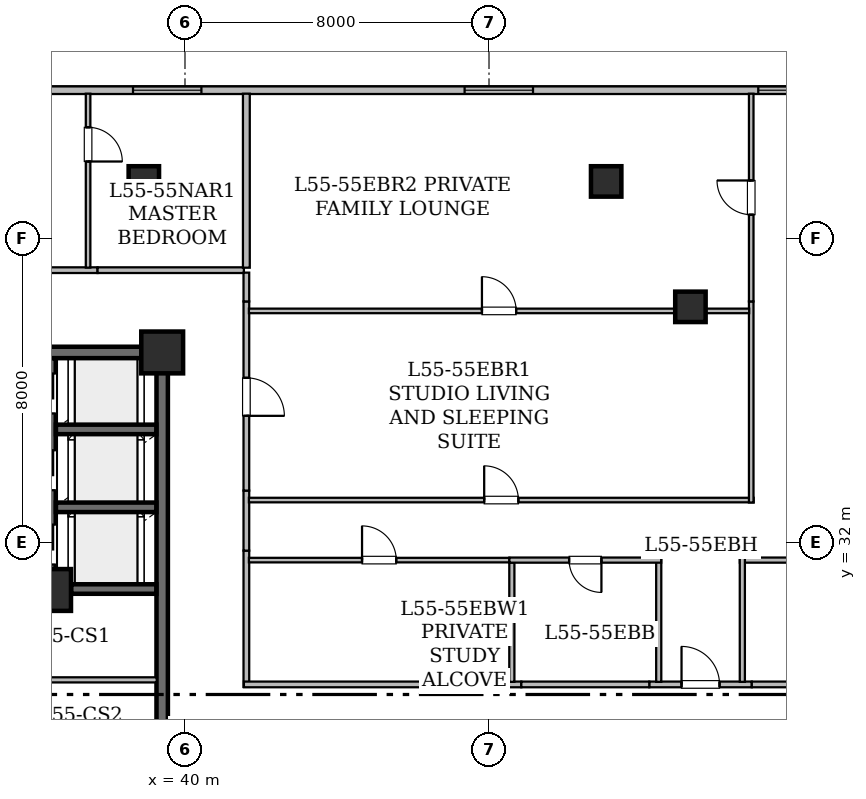
"""IFC4 building model, lengths in metres.
Left out: names, types, materials, properties, quantities, classifications, styles, units other than length and angle.
Written with IfcOpenShell. Run it as: python <this file> out.ifc"""

import sys

from ifc_helpers import new_model, si_unit, direction, frame, frame_2d, origin, origin_2d, place, context, subcontext, project, spatial, rectangle, hollow_rectangle, extrude, element, fill, save


model = new_model("IFC4")
c1 = context("Model", 3, precision=1e-05, world=origin(), true_north=direction((0.0, 1.0)))
c2 = subcontext(c1, "Body", "Model", "MODEL_VIEW")
j1 = project(units=[si_unit("LENGTHUNIT", "METRE"), si_unit("PLANEANGLEUNIT", "RADIAN")], contexts=[c1])
p1 = place(None, origin())
s1 = spatial("IfcSite", under=j1, at=p1, CompositionType="ELEMENT")
p2 = place(p1, origin())
s2 = spatial("IfcBuilding", under=s1, at=p2, CompositionType="ELEMENT")
p3 = place(p2, frame((0.0, 0.0, 217.2)))
s3 = spatial("IfcBuildingStorey", under=s2, at=p3, CompositionType="ELEMENT", Elevation=217.2)
for number, where, z_axis, x_axis in (
    (1, (36.45, 30.75, 0.0), (0.0, 0.0, 1.0), (1.0, 0.0, 0.0)),
    (2, (39.4, 37.0, 0.0), (0.0, 0.0, 1.0), (1.0, 0.0, 0.0)),
):
    element("IfcColumn", number, at=place(p3, frame(where, z_axis=z_axis, x_axis=x_axis)), inside=s3, PredefinedType="COLUMN", context=c2, shape_type="SweptSolid", body=[
        extrude(hollow_rectangle(XDim=1.1, YDim=1.1, WallThickness=0.055, at=origin_2d()), origin(), (0.0, 0.0, 1.0), 3.65),
    ])
for number, where, z_axis, x_axis in (
    (3, (38.917, 41.5, 0.025), (0.0, 0.0, 1.0), (1.0, 0.0, 0.0)),
    (4, (51.083, 41.5, 0.025), (0.0, 0.0, 1.0), (1.0, 0.0, 0.0)),
    (5, (53.3, 38.2, 0.025), (0.0, 0.0, 1.0), (1.0, 0.0, 0.0)),
):
    element("IfcColumn", number, at=place(p3, frame(where, z_axis=z_axis, x_axis=x_axis)), inside=s3, PredefinedType="COLUMN", context=c2, shape_type="SweptSolid", body=[
        extrude(hollow_rectangle(XDim=0.8, YDim=0.8, WallThickness=0.04, at=origin_2d()), origin(), (0.0, 0.0, 1.0), 3.625),
    ])
p4 = place(p3, frame((24.302, 43.9, 0.0), z_axis=(0.0, 0.0, 1.0), x_axis=(1.0, 0.0, 0.0)))
e6 = element("IfcWall", 6, at=p4, inside=s3, PredefinedType="STANDARD", context=c2, shape_type="SweptSolid", body=[
    extrude(rectangle(XDim=41.457, YDim=0.2, at=frame_2d((20.729, 0.0))), origin(), (0.0, 0.0, 1.0), 3.43),
])
p5 = place(p4, frame((0.509, 0.0, 0.85)))
e7 = element("IfcOpeningElement", 7, at=p5, cuts=e6, PredefinedType="OPENING", context=c2, shape_type="SweptSolid", body=[
    extrude(rectangle(XDim=1.8, YDim=0.92, at=frame_2d((0.9, 0.46))), frame((0.0, 0.11, 0.0), z_axis=(0.0, -1.0, 0.0), x_axis=(1.0, 0.0, 0.0)), (0.0, 0.0, 1.0), 0.22),
])
p6 = place(p4, frame((9.023, 0.0, 0.85)))
e8 = element("IfcOpeningElement", 8, at=p6, cuts=e6, PredefinedType="OPENING", context=c2, shape_type="SweptSolid", body=[
    extrude(rectangle(XDim=1.8, YDim=0.92, at=frame_2d((0.9, 0.46))), frame((0.0, 0.11, 0.0), z_axis=(0.0, -1.0, 0.0), x_axis=(1.0, 0.0, 0.0)), (0.0, 0.0, 1.0), 0.22),
])
p7 = place(p4, frame((14.33, 0.0, 0.85)))
e9 = element("IfcOpeningElement", 9, at=p7, cuts=e6, PredefinedType="OPENING", context=c2, shape_type="SweptSolid", body=[
    extrude(rectangle(XDim=1.8, YDim=0.92, at=frame_2d((0.9, 0.46))), frame((0.0, 0.11, 0.0), z_axis=(0.0, -1.0, 0.0), x_axis=(1.0, 0.0, 0.0)), (0.0, 0.0, 1.0), 0.22),
])
p8 = place(p4, frame((30.783, 0.0, 0.78)))
e10 = element("IfcOpeningElement", 10, at=p8, cuts=e6, PredefinedType="OPENING", context=c2, shape_type="SweptSolid", body=[
    extrude(rectangle(XDim=1.2, YDim=1.5, at=frame_2d((0.6, 0.75))), frame((0.0, 0.11, 0.0), z_axis=(0.0, -1.0, 0.0), x_axis=(1.0, 0.0, 0.0)), (0.0, 0.0, 1.0), 0.22),
])
p9 = place(p4, frame((23.056, 0.0, 0.85)))
e11 = element("IfcOpeningElement", 11, at=p9, cuts=e6, PredefinedType="OPENING", context=c2, shape_type="SweptSolid", body=[
    extrude(rectangle(XDim=1.8, YDim=0.92, at=frame_2d((0.9, 0.46))), frame((0.0, 0.11, 0.0), z_axis=(0.0, -1.0, 0.0), x_axis=(1.0, 0.0, 0.0)), (0.0, 0.0, 1.0), 0.22),
])
p10 = place(p4, frame((35.52, 0.0, 0.85)))
e12 = element("IfcOpeningElement", 12, at=p10, cuts=e6, PredefinedType="OPENING", context=c2, shape_type="SweptSolid", body=[
    extrude(rectangle(XDim=1.8, YDim=0.92, at=frame_2d((0.9, 0.46))), frame((0.0, 0.11, 0.0), z_axis=(0.0, -1.0, 0.0), x_axis=(1.0, 0.0, 0.0)), (0.0, 0.0, 1.0), 0.22),
])
p11 = place(p3, frame((29.0, 37.0, 0.0), z_axis=(0.0, 0.0, 1.0), x_axis=(1.0, 0.0, 0.0)))
e13 = element("IfcWall", 13, at=p11, inside=s3, PredefinedType="SHEAR", context=c2, shape_type="SweptSolid", body=[
    extrude(rectangle(XDim=10.4, YDim=0.3, at=frame_2d((5.2, 0.0))), origin(), (0.0, 0.0, 1.0), 3.43),
])
p12 = place(p11, frame((5.14, 0.0, 0.0)))
e14 = element("IfcOpeningElement", 14, at=p12, cuts=e13, PredefinedType="OPENING", context=c2, shape_type="SweptSolid", body=[
    extrude(rectangle(XDim=1.15, YDim=2.2, at=frame_2d((0.575, 1.1))), frame((0.0, 0.16, 0.0), z_axis=(0.0, -1.0, 0.0), x_axis=(1.0, 0.0, 0.0)), (0.0, 0.0, 1.0), 0.32),
])
p13 = place(p3, frame((39.4, 24.4, 0.0), z_axis=(0.0, 0.0, 1.0), x_axis=(0.0, 1.0, 0.0)))
e15 = element("IfcWall", 15, at=p13, inside=s3, PredefinedType="SHEAR", context=c2, shape_type="SweptSolid", body=[
    extrude(rectangle(XDim=12.6, YDim=0.3, at=frame_2d((6.3, 0.0))), origin(), (0.0, 0.0, 1.0), 3.43),
])
p14 = place(p3, frame((36.45, 31.3, 0.0), z_axis=(0.0, 0.0, 1.0), x_axis=(0.0, 1.0, 0.0)))
e16 = element("IfcWall", 16, at=p14, inside=s3, PredefinedType="SHEAR", context=c2, shape_type="SweptSolid", body=[
    extrude(rectangle(XDim=5.546, YDim=0.3, at=frame_2d((2.773, 0.0))), origin(), (0.0, 0.0, 1.0), 3.43),
])
p15 = place(p14, frame((0.12, 0.0, 0.0)))
e17 = element("IfcOpeningElement", 17, at=p15, cuts=e16, PredefinedType="OPENING", context=c2, shape_type="SweptSolid", body=[
    extrude(rectangle(XDim=1.05, YDim=2.15, at=frame_2d((0.525, 1.075))), frame((0.0, 0.16, 0.0), z_axis=(0.0, -1.0, 0.0), x_axis=(1.0, 0.0, 0.0)), (0.0, 0.0, 1.0), 0.32),
])
p16 = place(p14, frame((2.075, 0.0, 0.0)))
e18 = element("IfcOpeningElement", 18, at=p16, cuts=e16, PredefinedType="OPENING", context=c2, shape_type="SweptSolid", body=[
    extrude(rectangle(XDim=1.05, YDim=2.15, at=frame_2d((0.525, 1.075))), frame((0.0, 0.16, 0.0), z_axis=(0.0, -1.0, 0.0), x_axis=(1.0, 0.0, 0.0)), (0.0, 0.0, 1.0), 0.32),
])
p17 = place(p14, frame((4.095, 0.0, 0.0)))
e19 = element("IfcOpeningElement", 19, at=p17, cuts=e16, PredefinedType="OPENING", context=c2, shape_type="SweptSolid", body=[
    extrude(rectangle(XDim=1.05, YDim=2.15, at=frame_2d((0.525, 1.075))), frame((0.0, 0.16, 0.0), z_axis=(0.0, -1.0, 0.0), x_axis=(1.0, 0.0, 0.0)), (0.0, 0.0, 1.0), 0.32),
])
p18 = place(p3, frame((37.004, 30.775, 0.0), z_axis=(0.0, 0.0, 1.0), x_axis=(1.0, 0.0, 0.0)))
e20 = element("IfcWall", 20, at=p18, inside=s3, PredefinedType="SHEAR", context=c2, shape_type="SweptSolid", body=[
    extrude(rectangle(XDim=2.242, YDim=0.25, at=frame_2d((1.121, 0.0))), origin(), (0.0, 0.0, 1.0), 3.43),
])
for number, where, z_axis, x_axis in (
    (21, (36.604, 32.925, 0.0), (0.0, 0.0, 1.0), (1.0, 0.0, 0.0)),
    (22, (36.604, 34.975, 0.0), (0.0, 0.0, 1.0), (1.0, 0.0, 0.0)),
):
    element("IfcWall", number, at=place(p3, frame(where, z_axis=z_axis, x_axis=x_axis)), inside=s3, PredefinedType="SHEAR", context=c2, shape_type="SweptSolid", body=[
        extrude(rectangle(XDim=2.642, YDim=0.25, at=frame_2d((1.321, 0.0))), origin(), (0.0, 0.0, 1.0), 3.43),
    ])
p19 = place(p3, frame((39.256, 28.385, 0.0), z_axis=(0.0, 0.0, 1.0), x_axis=(-1.0, 0.0, 0.0)))
e23 = element("IfcWall", 23, at=p19, inside=s3, PredefinedType="PARTITIONING", context=c2, shape_type="SweptSolid", body=[
    extrude(rectangle(XDim=4.644, YDim=0.135, at=frame_2d((2.322, 0.0))), origin(), (0.0, 0.0, 1.0), 3.43),
])
p20 = place(p3, frame((30.751, 39.165, 0.0), z_axis=(0.0, 0.0, 1.0), x_axis=(1.0, 0.0, 0.0)))
e24 = element("IfcWall", 24, at=p20, inside=s3, PredefinedType="STANDARD", context=c2, shape_type="SweptSolid", body=[
    extrude(rectangle(XDim=6.948, YDim=0.15, at=frame_2d((3.474, 0.0))), origin(), (0.0, 0.0, 1.0), 3.43),
])
p21 = place(p20, frame((2.974, 0.0, 0.0)))
e25 = element("IfcOpeningElement", 25, at=p21, cuts=e24, PredefinedType="OPENING", context=c2, shape_type="SweptSolid", body=[
    extrude(rectangle(XDim=1.0, YDim=2.15, at=frame_2d((0.5, 1.075))), frame((0.0, 0.085, 0.0), z_axis=(0.0, -1.0, 0.0), x_axis=(1.0, 0.0, 0.0)), (0.0, 0.0, 1.0), 0.17),
])
p22 = place(p3, frame((37.699, 39.165, 0.0), z_axis=(0.0, 0.0, 1.0), x_axis=(1.0, 0.0, 0.0)))
e26 = element("IfcWall", 26, at=p22, inside=s3, PredefinedType="STANDARD", context=c2, shape_type="SweptSolid", body=[
    extrude(rectangle(XDim=3.851, YDim=0.15, at=frame_2d((1.926, 0.0))), origin(), (0.0, 0.0, 1.0), 2.725),
])
p23 = place(p3, frame((41.615, 31.785, 0.0), z_axis=(0.0, 0.0, 1.0), x_axis=(0.0, -1.0, 0.0)))
e27 = element("IfcWall", 27, at=p23, inside=s3, PredefinedType="STANDARD", context=c2, shape_type="SweptSolid", body=[
    extrude(rectangle(XDim=3.585, YDim=0.15, at=frame_2d((1.792, 0.0))), origin(), (0.0, 0.0, 1.0), 3.43),
])
p24 = place(p3, frame((41.55, 28.265, 0.0), z_axis=(0.0, 0.0, 1.0), x_axis=(1.0, 0.0, 0.0)))
e28 = element("IfcWall", 28, at=p24, inside=s3, PredefinedType="STANDARD", context=c2, shape_type="SweptSolid", body=[
    extrude(rectangle(XDim=7.3, YDim=0.15, at=frame_2d((3.65, 0.0))), origin(), (0.0, 0.0, 1.0), 3.43),
])
p25 = place(p3, frame((41.615, 33.365, 0.0), z_axis=(0.0, 0.0, 1.0), x_axis=(0.0, -1.0, 0.0)))
e29 = element("IfcWall", 29, at=p25, inside=s3, PredefinedType="STANDARD", context=c2, shape_type="SweptSolid", body=[
    extrude(rectangle(XDim=1.58, YDim=0.15, at=frame_2d((0.79, 0.0))), origin(), (0.0, 0.0, 1.0), 3.065),
])
p26 = place(p3, frame((52.217, 28.265, 0.0), z_axis=(0.0, 0.0, 1.0), x_axis=(1.0, 0.0, 0.0)))
e30 = element("IfcWall", 30, at=p26, inside=s3, PredefinedType="STANDARD", context=c2, shape_type="SweptSolid", body=[
    extrude(rectangle(XDim=2.698, YDim=0.15, at=frame_2d((1.349, 0.0))), origin(), (0.0, 0.0, 1.0), 2.725),
])
p27 = place(p26, frame((0.849, 0.0, 0.0)))
e31 = element("IfcOpeningElement", 31, at=p27, cuts=e30, PredefinedType="OPENING", context=c2, shape_type="SweptSolid", body=[
    extrude(rectangle(XDim=1.0, YDim=2.15, at=frame_2d((0.5, 1.075))), frame((0.0, 0.085, 0.0), z_axis=(0.0, -1.0, 0.0), x_axis=(1.0, 0.0, 0.0)), (0.0, 0.0, 1.0), 0.17),
])
p28 = place(p3, frame((48.85, 28.265, 0.0), z_axis=(0.0, 0.0, 1.0), x_axis=(1.0, 0.0, 0.0)))
e32 = element("IfcWall", 32, at=p28, inside=s3, PredefinedType="STANDARD", context=c2, shape_type="SweptSolid", body=[
    extrude(rectangle(XDim=3.367, YDim=0.15, at=frame_2d((1.684, 0.0))), origin(), (0.0, 0.0, 1.0), 3.43),
])
p29 = place(p3, frame((54.915, 28.265, 0.0), z_axis=(0.0, 0.0, 1.0), x_axis=(1.0, 0.0, 0.0)))
e33 = element("IfcWall", 33, at=p29, inside=s3, PredefinedType="STANDARD", context=c2, shape_type="SweptSolid", body=[
    extrude(rectangle(XDim=4.367, YDim=0.15, at=frame_2d((2.184, 0.0))), origin(), (0.0, 0.0, 1.0), 3.43),
])
p30 = place(p3, frame((41.615, 38.342, 0.0), z_axis=(0.0, 0.0, 1.0), x_axis=(0.0, -1.0, 0.0)))
e34 = element("IfcWall", 34, at=p30, inside=s3, PredefinedType="STANDARD", context=c2, shape_type="SweptSolid", body=[
    extrude(rectangle(XDim=4.977, YDim=0.15, at=frame_2d((2.489, 0.0))), origin(), (0.0, 0.0, 1.0), 2.725),
])
p31 = place(p30, frame((2.01, 0.0, 0.0)))
e35 = element("IfcOpeningElement", 35, at=p31, cuts=e34, PredefinedType="OPENING", context=c2, shape_type="SweptSolid", body=[
    extrude(rectangle(XDim=1.0, YDim=2.15, at=frame_2d((0.5, 1.075))), frame((0.0, 0.085, 0.0), z_axis=(0.0, -1.0, 0.0), x_axis=(1.0, 0.0, 0.0)), (0.0, 0.0, 1.0), 0.17),
])
p32 = place(p3, frame((41.615, 39.1, 0.0), z_axis=(0.0, 0.0, 1.0), x_axis=(0.0, -1.0, 0.0)))
e36 = element("IfcWall", 36, at=p32, inside=s3, PredefinedType="STANDARD", context=c2, shape_type="SweptSolid", body=[
    extrude(rectangle(XDim=0.758, YDim=0.15, at=frame_2d((0.379, 0.0))), origin(), (0.0, 0.0, 1.0), 3.43),
])
p33 = place(p3, frame((37.45, 43.808, 0.0), z_axis=(0.0, 0.0, 1.0), x_axis=(0.0, -1.0, 0.0)))
e37 = element("IfcWall", 37, at=p33, inside=s3, PredefinedType="PARTITIONING", context=c2, shape_type="SweptSolid", body=[
    extrude(rectangle(XDim=4.576, YDim=0.12, at=frame_2d((2.288, 0.0))), origin(), (0.0, 0.0, 1.0), 2.887),
])
p34 = place(p33, frame((0.884, 0.0, 0.0)))
e38 = element("IfcOpeningElement", 38, at=p34, cuts=e37, PredefinedType="OPENING", context=c2, shape_type="SweptSolid", body=[
    extrude(rectangle(XDim=0.9, YDim=2.1, at=frame_2d((0.45, 1.05))), frame((0.0, 0.07, 0.0), z_axis=(0.0, -1.0, 0.0), x_axis=(1.0, 0.0, 0.0)), (0.0, 0.0, 1.0), 0.14),
])
p35 = place(p3, frame((41.615, 43.808, 0.0), z_axis=(0.0, 0.0, 1.0), x_axis=(0.0, -1.0, 0.0)))
e39 = element("IfcWall", 39, at=p35, inside=s3, PredefinedType="STANDARD", context=c2, shape_type="SweptSolid", body=[
    extrude(rectangle(XDim=4.578, YDim=0.18, at=frame_2d((2.289, 0.0))), origin(), (0.0, 0.0, 1.0), 2.887),
])
p36 = place(p3, frame((41.682, 31.536, 0.0), z_axis=(0.0, 0.0, 1.0), x_axis=(1.0, 0.0, 0.0)))
e40 = element("IfcWall", 40, at=p36, inside=s3, PredefinedType="PARTITIONING", context=c2, shape_type="SweptSolid", body=[
    extrude(rectangle(XDim=6.854, YDim=0.12, at=frame_2d((3.427, 0.0))), origin(), (0.0, 0.0, 1.0), 3.43),
])
p37 = place(p36, frame((2.977, 0.0, 0.0)))
e41 = element("IfcOpeningElement", 41, at=p37, cuts=e40, PredefinedType="OPENING", context=c2, shape_type="SweptSolid", body=[
    extrude(rectangle(XDim=0.9, YDim=2.1, at=frame_2d((0.45, 1.05))), frame((0.0, 0.07, 0.0), z_axis=(0.0, -1.0, 0.0), x_axis=(1.0, 0.0, 0.0)), (0.0, 0.0, 1.0), 0.14),
])
p38 = place(p3, frame((48.601, 31.471, 0.0), z_axis=(0.0, 0.0, 1.0), x_axis=(0.0, -1.0, 0.0)))
e42 = element("IfcWall", 42, at=p38, inside=s3, PredefinedType="PARTITIONING", context=c2, shape_type="SweptSolid", body=[
    extrude(rectangle(XDim=3.139, YDim=0.135, at=frame_2d((1.569, 0.0))), origin(), (0.0, 0.0, 1.0), 3.43),
])
p39 = place(p3, frame((52.466, 28.332, 0.0), z_axis=(0.0, 0.0, 1.0), x_axis=(0.0, 1.0, 0.0)))
e43 = element("IfcWall", 43, at=p39, inside=s3, PredefinedType="PARTITIONING", context=c2, shape_type="SweptSolid", body=[
    extrude(rectangle(XDim=3.269, YDim=0.135, at=frame_2d((1.635, 0.0))), origin(), (0.0, 0.0, 1.0), 3.43),
])
p40 = place(p3, frame((52.531, 31.536, 0.0), z_axis=(0.0, 0.0, 1.0), x_axis=(-1.0, 0.0, 0.0)))
e44 = element("IfcWall", 44, at=p40, inside=s3, PredefinedType="PARTITIONING", context=c2, shape_type="SweptSolid", body=[
    extrude(rectangle(XDim=3.995, YDim=0.135, at=frame_2d((1.998, 0.0))), origin(), (0.0, 0.0, 1.0), 3.43),
])
p41 = place(p40, frame((1.573, 0.0, 0.0)))
e45 = element("IfcOpeningElement", 45, at=p41, cuts=e44, PredefinedType="OPENING", context=c2, shape_type="SweptSolid", body=[
    extrude(rectangle(XDim=0.85, YDim=2.1, at=frame_2d((0.425, 1.05))), frame((0.0, 0.077, 0.0), z_axis=(0.0, -1.0, 0.0), x_axis=(1.0, 0.0, 0.0)), (0.0, 0.0, 1.0), 0.155),
])
p42 = place(p3, frame((59.596, 31.536, 0.0), z_axis=(0.0, 0.0, 1.0), x_axis=(-1.0, 0.0, 0.0)))
e46 = element("IfcWall", 46, at=p42, inside=s3, PredefinedType="PARTITIONING", context=c2, shape_type="SweptSolid", body=[
    extrude(rectangle(XDim=4.995, YDim=0.135, at=frame_2d((2.498, 0.0))), origin(), (0.0, 0.0, 1.0), 3.43),
])
p43 = place(p42, frame((2.073, 0.0, 0.0)))
e47 = element("IfcOpeningElement", 47, at=p43, cuts=e46, PredefinedType="OPENING", context=c2, shape_type="SweptSolid", body=[
    extrude(rectangle(XDim=0.85, YDim=2.1, at=frame_2d((0.425, 1.05))), frame((0.0, 0.077, 0.0), z_axis=(0.0, -1.0, 0.0), x_axis=(1.0, 0.0, 0.0)), (0.0, 0.0, 1.0), 0.155),
])
p44 = place(p3, frame((54.666, 31.601, 0.0), z_axis=(0.0, 0.0, 1.0), x_axis=(0.0, -1.0, 0.0)))
e48 = element("IfcWall", 48, at=p44, inside=s3, PredefinedType="PARTITIONING", context=c2, shape_type="SweptSolid", body=[
    extrude(rectangle(XDim=3.269, YDim=0.135, at=frame_2d((1.635, 0.0))), origin(), (0.0, 0.0, 1.0), 3.43),
])
p45 = place(p3, frame((41.682, 33.116, 0.0), z_axis=(0.0, 0.0, 1.0), x_axis=(1.0, 0.0, 0.0)))
e49 = element("IfcWall", 49, at=p45, inside=s3, PredefinedType="PARTITIONING", context=c2, shape_type="SweptSolid", body=[
    extrude(rectangle(XDim=13.283, YDim=0.12, at=frame_2d((6.642, 0.0))), origin(), (0.0, 0.0, 1.0), 2.725),
])
p46 = place(p45, frame((6.191, 0.0, 0.0)))
e50 = element("IfcOpeningElement", 50, at=p46, cuts=e49, PredefinedType="OPENING", context=c2, shape_type="SweptSolid", body=[
    extrude(rectangle(XDim=0.9, YDim=2.1, at=frame_2d((0.45, 1.05))), frame((0.0, 0.07, 0.0), z_axis=(0.0, -1.0, 0.0), x_axis=(1.0, 0.0, 0.0)), (0.0, 0.0, 1.0), 0.14),
])
p47 = place(p3, frame((54.9, 33.051, 0.0), z_axis=(0.0, 0.0, 1.0), x_axis=(0.0, 1.0, 0.0)))
e51 = element("IfcWall", 51, at=p47, inside=s3, PredefinedType="PARTITIONING", context=c2, shape_type="SweptSolid", body=[
    extrude(rectangle(XDim=5.291, YDim=0.12, at=frame_2d((2.646, 0.0))), origin(), (0.0, 0.0, 1.0), 2.725),
])
p48 = place(p3, frame((54.9, 38.342, 0.0), z_axis=(0.0, 0.0, 1.0), x_axis=(0.0, 1.0, 0.0)))
e52 = element("IfcWall", 52, at=p48, inside=s3, PredefinedType="PARTITIONING", context=c2, shape_type="SweptSolid", body=[
    extrude(rectangle(XDim=5.466, YDim=0.12, at=frame_2d((2.733, 0.0))), origin(), (0.0, 0.0, 1.0), 2.725),
])
p49 = place(p48, frame((2.283, 0.0, 0.0)))
e53 = element("IfcOpeningElement", 53, at=p49, cuts=e52, PredefinedType="OPENING", context=c2, shape_type="SweptSolid", body=[
    extrude(rectangle(XDim=0.9, YDim=2.1, at=frame_2d((0.45, 1.05))), frame((0.0, 0.07, 0.0), z_axis=(0.0, -1.0, 0.0), x_axis=(1.0, 0.0, 0.0)), (0.0, 0.0, 1.0), 0.14),
])
p50 = place(p3, frame((41.682, 38.093, 0.0), z_axis=(0.0, 0.0, 1.0), x_axis=(1.0, 0.0, 0.0)))
e54 = element("IfcWall", 54, at=p50, inside=s3, PredefinedType="PARTITIONING", context=c2, shape_type="SweptSolid", body=[
    extrude(rectangle(XDim=13.164, YDim=0.12, at=frame_2d((6.582, 0.0))), origin(), (0.0, 0.0, 1.0), 2.725),
])
p51 = place(p50, frame((6.132, 0.0, 0.0)))
e55 = element("IfcOpeningElement", 55, at=p51, cuts=e54, PredefinedType="OPENING", context=c2, shape_type="SweptSolid", body=[
    extrude(rectangle(XDim=0.9, YDim=2.1, at=frame_2d((0.45, 1.05))), frame((0.0, 0.07, 0.0), z_axis=(0.0, -1.0, 0.0), x_axis=(1.0, 0.0, 0.0)), (0.0, 0.0, 1.0), 0.14),
])
p52 = place(p7, origin())
e56 = element("IfcWindow", 56, at=p52, inside=s3, PartitioningType="SINGLE_PANEL", PredefinedType="WINDOW", context=c2, shape_type="SweptSolid", body=[
    extrude(rectangle(XDim=1.8, YDim=0.92, at=frame_2d((0.9, 0.46))), frame((0.0, 0.03, 0.0), z_axis=(0.0, -1.0, 0.0), x_axis=(1.0, 0.0, 0.0)), (0.0, 0.0, 1.0), 0.06),
])
fill(e9, e56)
p53 = place(p8, origin())
e57 = element("IfcWindow", 57, at=p53, inside=s3, PartitioningType="SINGLE_PANEL", PredefinedType="WINDOW", context=c2, shape_type="SweptSolid", body=[
    extrude(rectangle(XDim=1.2, YDim=1.5, at=frame_2d((0.6, 0.75))), frame((0.0, 0.03, 0.0), z_axis=(0.0, -1.0, 0.0), x_axis=(1.0, 0.0, 0.0)), (0.0, 0.0, 1.0), 0.06),
])
fill(e10, e57)
p54 = place(p9, origin())
e58 = element("IfcWindow", 58, at=p54, inside=s3, PartitioningType="SINGLE_PANEL", PredefinedType="WINDOW", context=c2, shape_type="SweptSolid", body=[
    extrude(rectangle(XDim=1.8, YDim=0.92, at=frame_2d((0.9, 0.46))), frame((0.0, 0.03, 0.0), z_axis=(0.0, -1.0, 0.0), x_axis=(1.0, 0.0, 0.0)), (0.0, 0.0, 1.0), 0.06),
])
fill(e11, e58)
p55 = place(p27, origin())
e59 = element("IfcDoor", 59, at=p55, inside=s3, OperationType="SINGLE_SWING_LEFT", PredefinedType="DOOR", context=c2, shape_type="SweptSolid", body=[
    extrude(rectangle(XDim=1.0, YDim=2.15, at=frame_2d((0.5, 1.075))), frame((0.0, 0.025, 0.0), z_axis=(0.0, -1.0, 0.0), x_axis=(1.0, 0.0, 0.0)), (0.0, 0.0, 1.0), 0.05),
])
fill(e31, e59)
p56 = place(p31, origin())
e60 = element("IfcDoor", 60, at=p56, inside=s3, OperationType="SINGLE_SWING_RIGHT", PredefinedType="DOOR", context=c2, shape_type="SweptSolid", body=[
    extrude(rectangle(XDim=1.0, YDim=2.15, at=frame_2d((0.5, 1.075))), frame((0.0, 0.025, 0.0), z_axis=(0.0, -1.0, 0.0), x_axis=(1.0, 0.0, 0.0)), (0.0, 0.0, 1.0), 0.05),
])
fill(e35, e60)
p57 = place(p34, origin())
e61 = element("IfcDoor", 61, at=p57, inside=s3, OperationType="SINGLE_SWING_RIGHT", PredefinedType="DOOR", context=c2, shape_type="SweptSolid", body=[
    extrude(rectangle(XDim=0.9, YDim=2.1, at=frame_2d((0.45, 1.05))), frame((0.0, 0.025, 0.0), z_axis=(0.0, -1.0, 0.0), x_axis=(1.0, 0.0, 0.0)), (0.0, 0.0, 1.0), 0.05),
])
fill(e38, e61)
p58 = place(p37, origin())
e62 = element("IfcDoor", 62, at=p58, inside=s3, OperationType="SINGLE_SWING_LEFT", PredefinedType="DOOR", context=c2, shape_type="SweptSolid", body=[
    extrude(rectangle(XDim=0.9, YDim=2.1, at=frame_2d((0.45, 1.05))), frame((0.0, 0.025, 0.0), z_axis=(0.0, -1.0, 0.0), x_axis=(1.0, 0.0, 0.0)), (0.0, 0.0, 1.0), 0.05),
])
fill(e41, e62)
p59 = place(p41, origin())
e63 = element("IfcDoor", 63, at=p59, inside=s3, OperationType="SINGLE_SWING_LEFT", PredefinedType="DOOR", context=c2, shape_type="SweptSolid", body=[
    extrude(rectangle(XDim=0.85, YDim=2.1, at=frame_2d((0.425, 1.05))), frame((0.0, 0.025, 0.0), z_axis=(0.0, -1.0, 0.0), x_axis=(1.0, 0.0, 0.0)), (0.0, 0.0, 1.0), 0.05),
])
fill(e45, e63)
p60 = place(p46, origin())
e64 = element("IfcDoor", 64, at=p60, inside=s3, OperationType="SINGLE_SWING_LEFT", PredefinedType="DOOR", context=c2, shape_type="SweptSolid", body=[
    extrude(rectangle(XDim=0.9, YDim=2.1, at=frame_2d((0.45, 1.05))), frame((0.0, 0.025, 0.0), z_axis=(0.0, -1.0, 0.0), x_axis=(1.0, 0.0, 0.0)), (0.0, 0.0, 1.0), 0.05),
])
fill(e50, e64)
p61 = place(p49, origin())
e65 = element("IfcDoor", 65, at=p61, inside=s3, OperationType="SINGLE_SWING_RIGHT", PredefinedType="DOOR", context=c2, shape_type="SweptSolid", body=[
    extrude(rectangle(XDim=0.9, YDim=2.1, at=frame_2d((0.45, 1.05))), frame((0.0, 0.025, 0.0), z_axis=(0.0, -1.0, 0.0), x_axis=(1.0, 0.0, 0.0)), (0.0, 0.0, 1.0), 0.05),
])
fill(e53, e65)
p62 = place(p51, origin())
e66 = element("IfcDoor", 66, at=p62, inside=s3, OperationType="SINGLE_SWING_LEFT", PredefinedType="DOOR", context=c2, shape_type="SweptSolid", body=[
    extrude(rectangle(XDim=0.9, YDim=2.1, at=frame_2d((0.45, 1.05))), frame((0.0, 0.025, 0.0), z_axis=(0.0, -1.0, 0.0), x_axis=(1.0, 0.0, 0.0)), (0.0, 0.0, 1.0), 0.05),
])
fill(e55, e66)
save(model, sys.argv[1])
